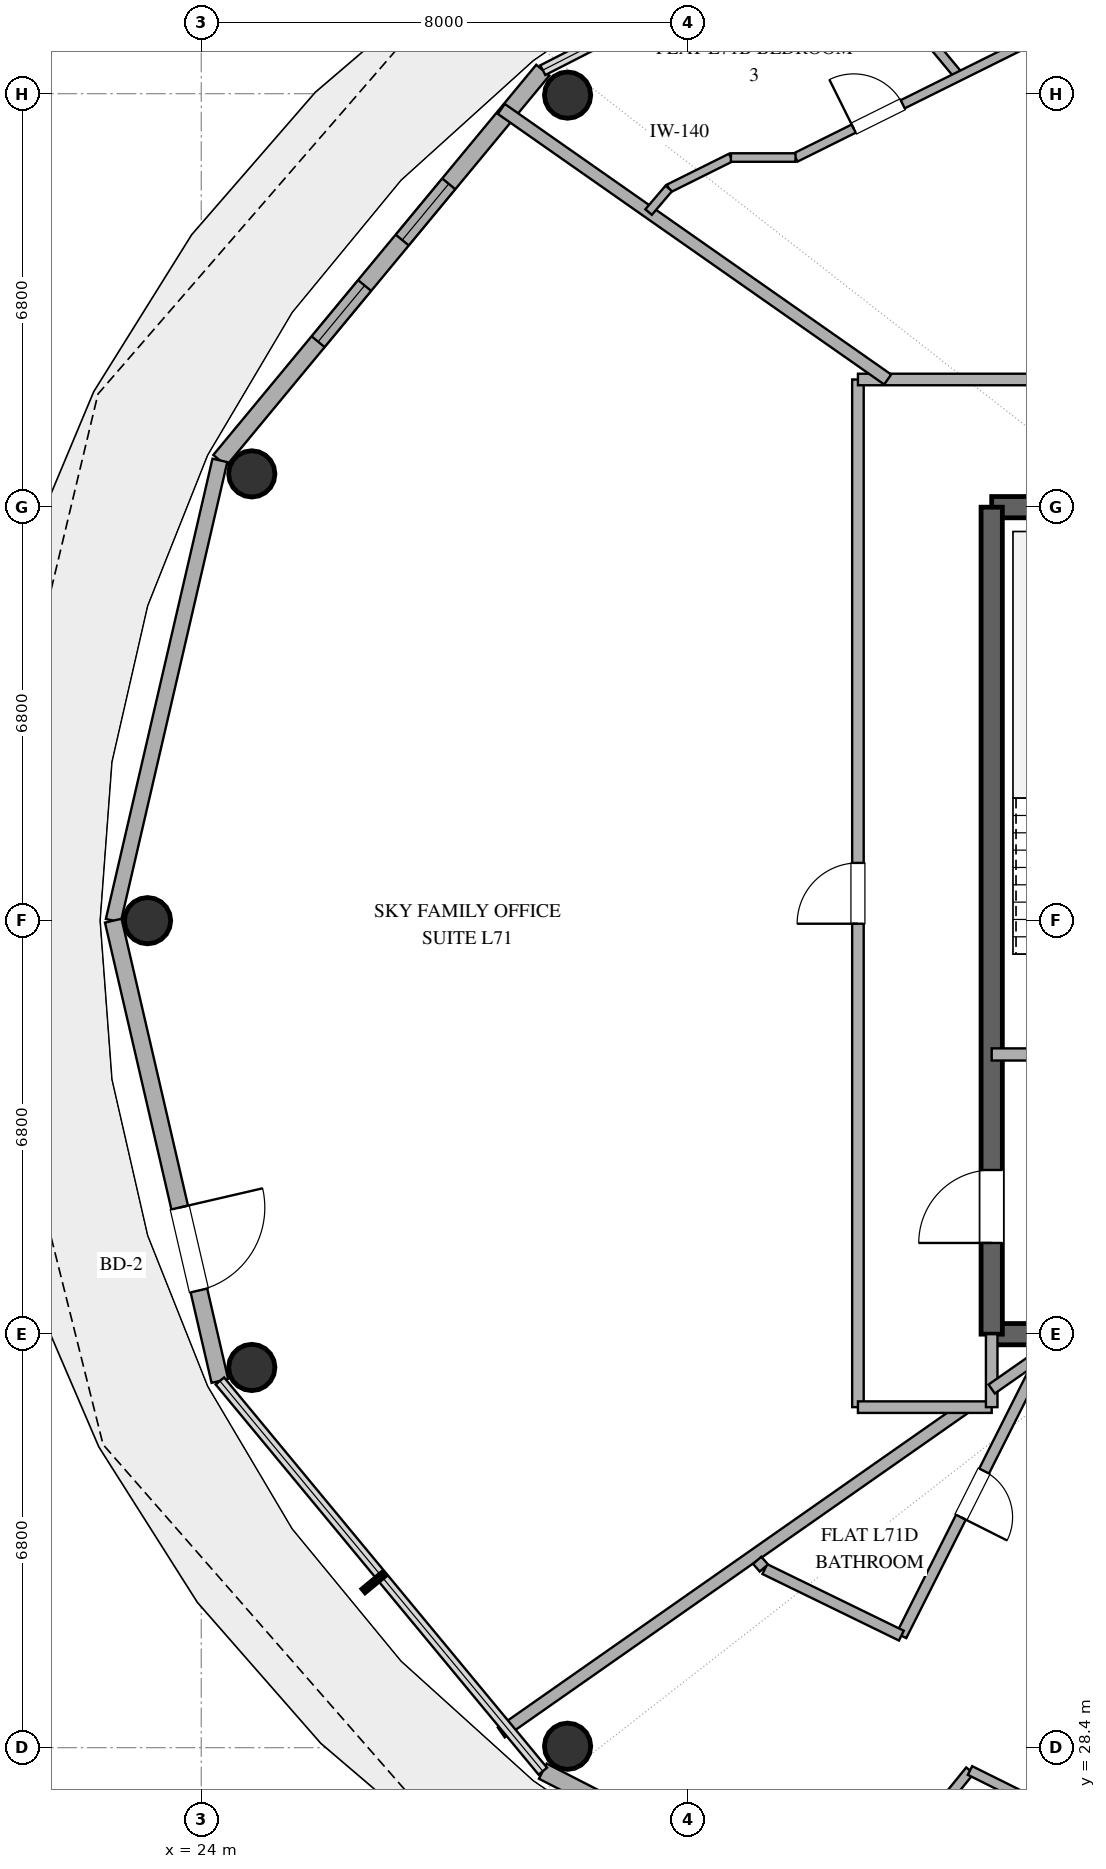
"""IFC4 building model, lengths in metres.
Left out: names, types, materials, properties, quantities, classifications, styles, units other than length and angle.
Written with IfcOpenShell. Run it as: python <this file> out.ifc"""

import sys

from ifc_helpers import new_model, si_unit, direction, frame, frame_2d, origin, origin_2d, place, context, subcontext, project, spatial, rectangle, hollow_circle, extrude, element, fill, save


model = new_model("IFC4")
c1 = context("Model", 3, precision=1e-05, world=origin(), true_north=direction((0.0, 1.0)))
c2 = subcontext(c1, "Body", "Model", "MODEL_VIEW")
j1 = project(units=[si_unit("LENGTHUNIT", "METRE"), si_unit("PLANEANGLEUNIT", "RADIAN")], contexts=[c1])
p1 = place(None, origin())
s1 = spatial("IfcSite", under=j1, at=p1, CompositionType="ELEMENT")
p2 = place(p1, origin())
s2 = spatial("IfcBuilding", under=s1, at=p2, CompositionType="ELEMENT")
p3 = place(p2, frame((0.0, 0.0, 276.6)))
s3 = spatial("IfcBuildingStorey", under=s2, at=p3, CompositionType="ELEMENT", Elevation=276.6)
for number, where, z_axis, x_axis in (
    (1, (37.0, 35.2, 0.0), (0.0, 0.0, 1.0), (1.0, 0.0, 0.0)),
    (2, (37.0, 48.8, 0.0), (0.0, 0.0, 1.0), (1.0, 0.0, 0.0)),
):
    element("IfcWall", number, at=place(p3, frame(where, z_axis=z_axis, x_axis=x_axis)), inside=s3, PredefinedType="SHEAR", context=c2, shape_type="SweptSolid", body=[
        extrude(rectangle(XDim=4.0, YDim=0.35, at=frame_2d((2.0, 0.0))), origin(), (0.0, 0.0, 1.0), 3.37),
    ])
p4 = place(p3, frame((37.0, 35.2, 0.0), z_axis=(0.0, 0.0, 1.0), x_axis=(0.0, 1.0, 0.0)))
e3 = element("IfcWall", 3, at=p4, inside=s3, PredefinedType="SHEAR", context=c2, shape_type="SweptSolid", body=[
    extrude(rectangle(XDim=13.6, YDim=0.35, at=frame_2d((6.8, 0.0))), origin(), (0.0, 0.0, 1.0), 3.37),
])
p5 = place(p4, frame((1.5, 0.0, 0.0)))
e4 = element("IfcOpeningElement", 4, at=p5, cuts=e3, PredefinedType="OPENING", context=c2, shape_type="SweptSolid", body=[
    extrude(rectangle(XDim=1.2, YDim=2.15, at=frame_2d((0.6, 1.075))), frame((0.0, 0.185, 0.0), z_axis=(0.0, -1.0, 0.0), x_axis=(1.0, 0.0, 0.0)), (0.0, 0.0, 1.0), 0.37),
])
for number, where, z_axis, x_axis in (
    (5, (30.025, 55.576, 0.0), (0.0, 0.0, 1.0), (1.0, 0.0, 0.0)),
    (6, (24.831, 49.347, 0.0), (0.0, 0.0, 1.0), (1.0, 0.0, 0.0)),
    (7, (23.117, 42.0, 0.0), (0.0, 0.0, 1.0), (1.0, 0.0, 0.0)),
    (8, (24.831, 34.653, 0.0), (0.0, 0.0, 1.0), (1.0, 0.0, 0.0)),
    (9, (30.025, 28.424, 0.0), (0.0, 0.0, 1.0), (1.0, 0.0, 0.0)),
):
    element("IfcColumn", number, at=place(p3, frame(where, z_axis=z_axis, x_axis=x_axis)), inside=s3, PredefinedType="COLUMN", context=c2, shape_type="SweptSolid", body=[
        extrude(hollow_circle(Radius=0.381, WallThickness=0.025, at=origin_2d()), origin(), (0.0, 0.0, 1.0), 3.37),
    ])
p6 = place(p3, frame((29.617, 55.987, 0.0), z_axis=(0.0, 0.0, 1.0), x_axis=(-0.63761509934, -0.770355103243, 0.0)))
e10 = element("IfcWall", 10, at=p6, inside=s3, PredefinedType="SOLIDWALL", context=c2, shape_type="SweptSolid", body=[
    extrude(rectangle(XDim=8.33, YDim=0.28, at=frame_2d((4.165, 0.0))), origin(), (0.0, 0.0, 1.0), 3.37),
])
p7 = place(p6, frame((2.426, 0.0, 0.85)))
e11 = element("IfcOpeningElement", 11, at=p7, cuts=e10, PredefinedType="OPENING", context=c2, shape_type="SweptSolid", body=[
    extrude(rectangle(XDim=1.2, YDim=1.8, at=frame_2d((0.6, 0.9))), frame((0.0, 0.15, 0.0), z_axis=(0.0, -1.0, 0.0), x_axis=(1.0, 0.0, 0.0)), (0.0, 0.0, 1.0), 0.3),
])
p8 = place(p6, frame((4.596, 0.0, 0.85)))
e12 = element("IfcOpeningElement", 12, at=p8, cuts=e10, PredefinedType="OPENING", context=c2, shape_type="SweptSolid", body=[
    extrude(rectangle(XDim=1.2, YDim=1.8, at=frame_2d((0.6, 0.9))), frame((0.0, 0.15, 0.0), z_axis=(0.0, -1.0, 0.0), x_axis=(1.0, 0.0, 0.0)), (0.0, 0.0, 1.0), 0.3),
])
p9 = place(p3, frame((24.306, 49.57, 0.0), z_axis=(0.0, 0.0, 1.0), x_axis=(-0.225635078214, -0.974211892495, 0.0)))
e13 = element("IfcWall", 13, at=p9, inside=s3, PredefinedType="SOLIDWALL", context=c2, shape_type="SweptSolid", body=[
    extrude(rectangle(XDim=7.77, YDim=0.25, at=frame_2d((3.885, 0.0))), origin(), (0.0, 0.0, 1.0), 3.37),
])
p10 = place(p3, frame((22.553, 42.0, 0.0), z_axis=(0.0, 0.0, 1.0), x_axis=(0.225635078214, -0.974211892495, 0.0)))
e14 = element("IfcWall", 14, at=p10, inside=s3, PredefinedType="SOLIDWALL", context=c2, shape_type="SweptSolid", body=[
    extrude(rectangle(XDim=7.77, YDim=0.28, at=frame_2d((3.885, 0.0))), origin(), (0.0, 0.0, 1.0), 3.37),
])
p11 = place(p10, frame((4.842, 0.0, 0.0)))
e15 = element("IfcOpeningElement", 15, at=p11, cuts=e14, PredefinedType="OPENING", context=c2, shape_type="SweptSolid", body=[
    extrude(rectangle(XDim=1.4, YDim=2.2, at=frame_2d((0.7, 1.1))), frame((0.0, 0.15, 0.0), z_axis=(0.0, -1.0, 0.0), x_axis=(1.0, 0.0, 0.0)), (0.0, 0.0, 1.0), 0.3),
])
p12 = place(p3, frame((29.617, 28.013, 0.0), z_axis=(0.0, 0.0, 1.0), x_axis=(0.890007394051, -0.455946091699, 0.0)))
e16 = element("IfcWall", 16, at=p12, inside=s3, PredefinedType="SOLIDWALL", context=c2, shape_type="SweptSolid", body=[
    extrude(rectangle(XDim=9.404, YDim=0.28, at=frame_2d((4.702, 0.0))), origin(), (0.0, 0.0, 1.0), 3.37),
])
p13 = place(p12, frame((2.609, 0.0, 0.85)))
e17 = element("IfcOpeningElement", 17, at=p13, cuts=e16, PredefinedType="OPENING", context=c2, shape_type="SweptSolid", body=[
    extrude(rectangle(XDim=1.65, YDim=2.0, at=frame_2d((0.825, 1.0))), frame((0.0, 0.15, 0.0), z_axis=(0.0, -1.0, 0.0), x_axis=(1.0, 0.0, 0.0)), (0.0, 0.0, 1.0), 0.3),
])
p14 = place(p12, frame((6.125, 0.0, 0.85)))
e18 = element("IfcOpeningElement", 18, at=p14, cuts=e16, PredefinedType="OPENING", context=c2, shape_type="SweptSolid", body=[
    extrude(rectangle(XDim=1.5, YDim=2.0, at=frame_2d((0.75, 1.0))), frame((0.0, 0.15, 0.0), z_axis=(0.0, -1.0, 0.0), x_axis=(1.0, 0.0, 0.0)), (0.0, 0.0, 1.0), 0.3),
])
p15 = place(p3, frame((37.0, 39.8, 0.0), z_axis=(0.0, 0.0, 1.0), x_axis=(1.0, 0.0, 0.0)))
e19 = element("IfcWall", 19, at=p15, inside=s3, PredefinedType="SOLIDWALL", context=c2, shape_type="SweptSolid", body=[
    extrude(rectangle(XDim=4.0, YDim=0.2, at=frame_2d((2.0, 0.0))), origin(), (0.0, 0.0, 1.0), 2.73),
])
p16 = place(p15, frame((1.45, 0.0, 0.0)))
e20 = element("IfcOpeningElement", 20, at=p16, cuts=e19, PredefinedType="OPENING", context=c2, shape_type="SweptSolid", body=[
    extrude(rectangle(XDim=1.1, YDim=2.15, at=frame_2d((0.55, 1.075))), frame((0.0, 0.11, 0.0), z_axis=(0.0, -1.0, 0.0), x_axis=(1.0, 0.0, 0.0)), (0.0, 0.0, 1.0), 0.22),
])
p17 = place(p3, frame((34.8, 34.0, 0.0), z_axis=(0.0, 0.0, 1.0), x_axis=(0.0, 1.0, 0.0)))
e21 = element("IfcWall", 21, at=p17, inside=s3, PredefinedType="PARTITIONING", context=c2, shape_type="SweptSolid", body=[
    extrude(rectangle(XDim=16.9, YDim=0.19, at=frame_2d((8.45, 0.0))), origin(), (0.0, 0.0, 1.0), 2.73),
])
p18 = place(p17, frame((7.95, 0.0, 0.0)))
e22 = element("IfcOpeningElement", 22, at=p18, cuts=e21, PredefinedType="OPENING", context=c2, shape_type="SweptSolid", body=[
    extrude(rectangle(XDim=1.0, YDim=2.2, at=frame_2d((0.5, 1.1))), frame((0.0, 0.105, 0.0), z_axis=(0.0, -1.0, 0.0), x_axis=(1.0, 0.0, 0.0)), (0.0, 0.0, 1.0), 0.21),
])
p19 = place(p3, frame((34.8, 50.9, 0.0), z_axis=(0.0, 0.0, 1.0), x_axis=(1.0, 0.0, 0.0)))
e23 = element("IfcWall", 23, at=p19, inside=s3, PredefinedType="PARTITIONING", context=c2, shape_type="SweptSolid", body=[
    extrude(rectangle(XDim=15.618, YDim=0.19, at=frame_2d((7.809, 0.0))), origin(), (0.0, 0.0, 1.0), 2.73),
])
p20 = place(p19, frame((6.848, 0.0, 0.0)))
e24 = element("IfcOpeningElement", 24, at=p20, cuts=e23, PredefinedType="OPENING", context=c2, shape_type="SweptSolid", body=[
    extrude(rectangle(XDim=1.0, YDim=2.2, at=frame_2d((0.5, 1.1))), frame((0.0, 0.105, 0.0), z_axis=(0.0, -1.0, 0.0), x_axis=(1.0, 0.0, 0.0)), (0.0, 0.0, 1.0), 0.21),
])
p21 = place(p3, frame((37.855, 34.896, 0.0), z_axis=(0.0, 0.0, 1.0), x_axis=(-0.449274589412, -0.893393722447, 0.0)))
e25 = element("IfcWall", 25, at=p21, inside=s3, PredefinedType="PLUMBINGWALL", context=c2, shape_type="SweptSolid", body=[
    extrude(rectangle(XDim=5.209, YDim=0.18, at=frame_2d((2.604, 0.0))), origin(), (0.0, 0.0, 1.0), 2.73),
])
p22 = place(p21, frame((2.18, 0.0, 0.0)))
e26 = element("IfcOpeningElement", 26, at=p22, cuts=e25, PredefinedType="OPENING", context=c2, shape_type="SweptSolid", body=[
    extrude(rectangle(XDim=0.85, YDim=2.1, at=frame_2d((0.425, 1.05))), frame((0.0, 0.1, 0.0), z_axis=(0.0, -1.0, 0.0), x_axis=(1.0, 0.0, 0.0)), (0.0, 0.0, 1.0), 0.2),
])
p23 = place(p3, frame((36.575, 34.0, 0.0), z_axis=(0.0, 0.0, 1.0), x_axis=(-0.819138444565, -0.57359585828, 0.0)))
e27 = element("IfcWall", 27, at=p23, inside=s3, PredefinedType="PARTITIONING", context=c2, shape_type="SweptSolid", body=[
    extrude(rectangle(XDim=9.326, YDim=0.2, at=frame_2d((4.663, 0.0))), origin(), (0.0, 0.0, 1.0), 2.73),
])
p24 = place(p3, frame((35.29, 50.9, 0.0), z_axis=(0.0, 0.0, 1.0), x_axis=(-0.819162424527, 0.573561611549, 0.0)))
e28 = element("IfcWall", 28, at=p24, inside=s3, PredefinedType="PARTITIONING", context=c2, shape_type="SweptSolid", body=[
    extrude(rectangle(XDim=7.758, YDim=0.2, at=frame_2d((3.879, 0.0))), origin(), (0.0, 0.0, 1.0), 2.73),
])
p25 = place(p3, frame((36.465, 55.887, 0.0), z_axis=(0.0, 0.0, 1.0), x_axis=(-0.638979285107, 0.769223942168, 0.0)))
e29 = element("IfcWall", 29, at=p25, inside=s3, PredefinedType="PARTITIONING", context=c2, shape_type="SweptSolid", body=[
    extrude(rectangle(XDim=3.41, YDim=0.15, at=frame_2d((1.705, 0.0))), origin(), (0.0, 0.0, 1.0), 2.73),
])
p26 = place(p3, frame((36.643, 28.024, 0.0), z_axis=(0.0, 0.0, 1.0), x_axis=(-0.630641219738, -0.776074514442, 0.0)))
e30 = element("IfcWall", 30, at=p26, inside=s3, PredefinedType="PLUMBINGWALL", context=c2, shape_type="SweptSolid", body=[
    extrude(rectangle(XDim=3.405, YDim=0.16, at=frame_2d((1.702, 0.0))), origin(), (0.0, 0.0, 1.0), 2.73),
])
p27 = place(p26, frame((1.192, 0.0, 0.0)))
e31 = element("IfcOpeningElement", 31, at=p27, cuts=e30, PredefinedType="OPENING", context=c2, shape_type="SweptSolid", body=[
    extrude(rectangle(XDim=0.9, YDim=2.1, at=frame_2d((0.45, 1.05))), frame((0.0, 0.09, 0.0), z_axis=(0.0, -1.0, 0.0), x_axis=(1.0, 0.0, 0.0)), (0.0, 0.0, 1.0), 0.18),
])
p28 = place(p3, frame((33.773, 54.55, 0.0), z_axis=(0.0, 0.0, 1.0), x_axis=(0.895593510097, 0.44487331306, 0.0)))
e32 = element("IfcWall", 32, at=p28, inside=s3, PredefinedType="PARTITIONING", context=c2, shape_type="SweptSolid", body=[
    extrude(rectangle(XDim=6.222, YDim=0.15, at=frame_2d((3.111, 0.0))), origin(), (0.0, 0.0, 1.0), 2.73),
])
p29 = place(p28, frame((4.147, 0.0, 0.0)))
e33 = element("IfcOpeningElement", 33, at=p29, cuts=e32, PredefinedType="OPENING", context=c2, shape_type="SweptSolid", body=[
    extrude(rectangle(XDim=0.9, YDim=2.1, at=frame_2d((0.45, 1.05))), frame((0.0, 0.085, 0.0), z_axis=(0.0, -1.0, 0.0), x_axis=(1.0, 0.0, 0.0)), (0.0, 0.0, 1.0), 0.17),
])
p30 = place(p28, frame((1.069, 0.0, 0.0)))
e34 = element("IfcOpeningElement", 34, at=p30, cuts=e32, PredefinedType="OPENING", context=c2, shape_type="SweptSolid", body=[
    extrude(rectangle(XDim=0.9, YDim=2.1, at=frame_2d((0.45, 1.05))), frame((0.0, 0.085, 0.0), z_axis=(0.0, -1.0, 0.0), x_axis=(1.0, 0.0, 0.0)), (0.0, 0.0, 1.0), 0.17),
])
p31 = place(p3, frame((39.345, 26.682, 0.0), z_axis=(0.0, 0.0, 1.0), x_axis=(-0.895589359885, 0.44488166793, 0.0)))
e35 = element("IfcWall", 35, at=p31, inside=s3, PredefinedType="PLUMBINGWALL", context=c2, shape_type="SweptSolid", body=[
    extrude(rectangle(XDim=3.017, YDim=0.16, at=frame_2d((1.509, 0.0))), origin(), (0.0, 0.0, 1.0), 2.73),
])
p32 = place(p3, frame((35.514, 30.242, 0.0), z_axis=(0.0, 0.0, 1.0), x_axis=(-0.898915857852, 0.438121307975, 0.0)))
e36 = element("IfcWall", 36, at=p32, inside=s3, PredefinedType="PLUMBINGWALL", context=c2, shape_type="SweptSolid", body=[
    extrude(rectangle(XDim=2.498, YDim=0.18, at=frame_2d((1.249, 0.0))), origin(), (0.0, 0.0, 1.0), 2.73),
])
p33 = place(p3, frame((37.0, 34.0, 0.0), z_axis=(0.0, 0.0, 1.0), x_axis=(-1.0, 0.0, 0.0)))
e37 = element("IfcWall", 37, at=p33, inside=s3, PredefinedType="PARTITIONING", context=c2, shape_type="SweptSolid", body=[
    extrude(rectangle(XDim=2.2, YDim=0.19, at=frame_2d((1.1, 0.0))), origin(), (0.0, 0.0, 1.0), 2.73),
])
p34 = place(p3, frame((37.0, 35.2, 0.0), z_axis=(0.0, 0.0, 1.0), x_axis=(0.0, -1.0, 0.0)))
e38 = element("IfcWall", 38, at=p34, inside=s3, PredefinedType="PARTITIONING", context=c2, shape_type="SweptSolid", body=[
    extrude(rectangle(XDim=1.2, YDim=0.19, at=frame_2d((0.6, 0.0))), origin(), (0.0, 0.0, 1.0), 2.73),
])
p35 = place(p3, frame((31.689, 54.042, 0.0), z_axis=(0.0, 0.0, 1.0), x_axis=(0.895409226325, 0.445244109912, 0.0)))
e39 = element("IfcWall", 39, at=p35, inside=s3, PredefinedType="PARTITIONING", context=c2, shape_type="SweptSolid", body=[
    extrude(rectangle(XDim=1.141, YDim=0.14, at=frame_2d((0.571, 0.0))), origin(), (0.0, 0.0, 1.0), 2.73),
])
p36 = place(p3, frame((32.711, 54.55, 0.0), z_axis=(0.0, 0.0, 1.0), x_axis=(1.0, 0.0, 0.0)))
e40 = element("IfcWall", 40, at=p36, inside=s3, PredefinedType="PARTITIONING", context=c2, shape_type="SweptSolid", body=[
    extrude(rectangle(XDim=1.062, YDim=0.14, at=frame_2d((0.531, 0.0))), origin(), (0.0, 0.0, 1.0), 2.73),
])
p37 = place(p3, frame((37.0, 34.298, 0.0), z_axis=(0.0, 0.0, 1.0), x_axis=(0.81908900763, 0.573666451502, 0.0)))
e41 = element("IfcWall", 41, at=p37, inside=s3, PredefinedType="PLUMBINGWALL", context=c2, shape_type="SweptSolid", body=[
    extrude(rectangle(XDim=1.043, YDim=0.18, at=frame_2d((0.522, 0.0))), origin(), (0.0, 0.0, 1.0), 2.73),
])
p38 = place(p3, frame((31.357, 53.653, 0.0), z_axis=(0.0, 0.0, 1.0), x_axis=(0.648979151054, 0.76080619181, 0.0)))
e42 = element("IfcWall", 42, at=p38, inside=s3, PredefinedType="PARTITIONING", context=c2, shape_type="SweptSolid", body=[
    extrude(rectangle(XDim=0.511, YDim=0.14, at=frame_2d((0.255, 0.0))), origin(), (0.0, 0.0, 1.0), 2.73),
])
p39 = place(p3, frame((33.253, 31.355, 0.0), z_axis=(0.0, 0.0, 1.0), x_axis=(-0.656323784366, 0.754479350331, 0.0)))
e43 = element("IfcWall", 43, at=p39, inside=s3, PredefinedType="PLUMBINGWALL", context=c2, shape_type="SweptSolid", body=[
    extrude(rectangle(XDim=0.167, YDim=0.18, at=frame_2d((0.083, 0.0))), origin(), (0.0, 0.0, 1.0), 2.73),
])
p40 = place(p7, origin())
e44 = element("IfcWindow", 44, at=p40, inside=s3, PartitioningType="SINGLE_PANEL", PredefinedType="WINDOW", context=c2, shape_type="SweptSolid", body=[
    extrude(rectangle(XDim=1.2, YDim=1.8, at=frame_2d((0.6, 0.9))), frame((0.0, 0.03, 0.0), z_axis=(0.0, -1.0, 0.0), x_axis=(1.0, 0.0, 0.0)), (0.0, 0.0, 1.0), 0.06),
])
fill(e11, e44)
p41 = place(p8, origin())
e45 = element("IfcWindow", 45, at=p41, inside=s3, PartitioningType="SINGLE_PANEL", PredefinedType="WINDOW", context=c2, shape_type="SweptSolid", body=[
    extrude(rectangle(XDim=1.2, YDim=1.8, at=frame_2d((0.6, 0.9))), frame((0.0, 0.03, 0.0), z_axis=(0.0, -1.0, 0.0), x_axis=(1.0, 0.0, 0.0)), (0.0, 0.0, 1.0), 0.06),
])
fill(e12, e45)
p42 = place(p11, origin())
e46 = element("IfcDoor", 46, at=p42, inside=s3, OperationType="SINGLE_SWING_LEFT", PredefinedType="DOOR", context=c2, shape_type="SweptSolid", body=[
    extrude(rectangle(XDim=1.4, YDim=2.2, at=frame_2d((0.7, 1.1))), frame((0.0, 0.025, 0.0), z_axis=(0.0, -1.0, 0.0), x_axis=(1.0, 0.0, 0.0)), (0.0, 0.0, 1.0), 0.05),
])
fill(e15, e46)
p43 = place(p5, origin())
e47 = element("IfcDoor", 47, at=p43, inside=s3, OperationType="SINGLE_SWING_LEFT", PredefinedType="DOOR", context=c2, shape_type="SweptSolid", body=[
    extrude(rectangle(XDim=1.2, YDim=2.15, at=frame_2d((0.6, 1.075))), frame((0.0, 0.025, 0.0), z_axis=(0.0, -1.0, 0.0), x_axis=(1.0, 0.0, 0.0)), (0.0, 0.0, 1.0), 0.05),
])
fill(e4, e47)
p44 = place(p18, origin())
e48 = element("IfcDoor", 48, at=p44, inside=s3, OperationType="SINGLE_SWING_LEFT", PredefinedType="DOOR", context=c2, shape_type="SweptSolid", body=[
    extrude(rectangle(XDim=1.0, YDim=2.2, at=frame_2d((0.5, 1.1))), frame((0.0, 0.025, 0.0), z_axis=(0.0, -1.0, 0.0), x_axis=(1.0, 0.0, 0.0)), (0.0, 0.0, 1.0), 0.05),
])
fill(e22, e48)
p45 = place(p22, origin())
e49 = element("IfcDoor", 49, at=p45, inside=s3, OperationType="SINGLE_SWING_RIGHT", PredefinedType="DOOR", context=c2, shape_type="SweptSolid", body=[
    extrude(rectangle(XDim=0.85, YDim=2.1, at=frame_2d((0.425, 1.05))), frame((0.0, 0.025, 0.0), z_axis=(0.0, -1.0, 0.0), x_axis=(1.0, 0.0, 0.0)), (0.0, 0.0, 1.0), 0.05),
])
fill(e26, e49)
p46 = place(p30, origin())
e50 = element("IfcDoor", 50, at=p46, inside=s3, OperationType="SINGLE_SWING_LEFT", PredefinedType="DOOR", context=c2, shape_type="SweptSolid", body=[
    extrude(rectangle(XDim=0.9, YDim=2.1, at=frame_2d((0.45, 1.05))), frame((0.0, 0.025, 0.0), z_axis=(0.0, -1.0, 0.0), x_axis=(1.0, 0.0, 0.0)), (0.0, 0.0, 1.0), 0.05),
])
fill(e34, e50)
save(model, sys.argv[1])
